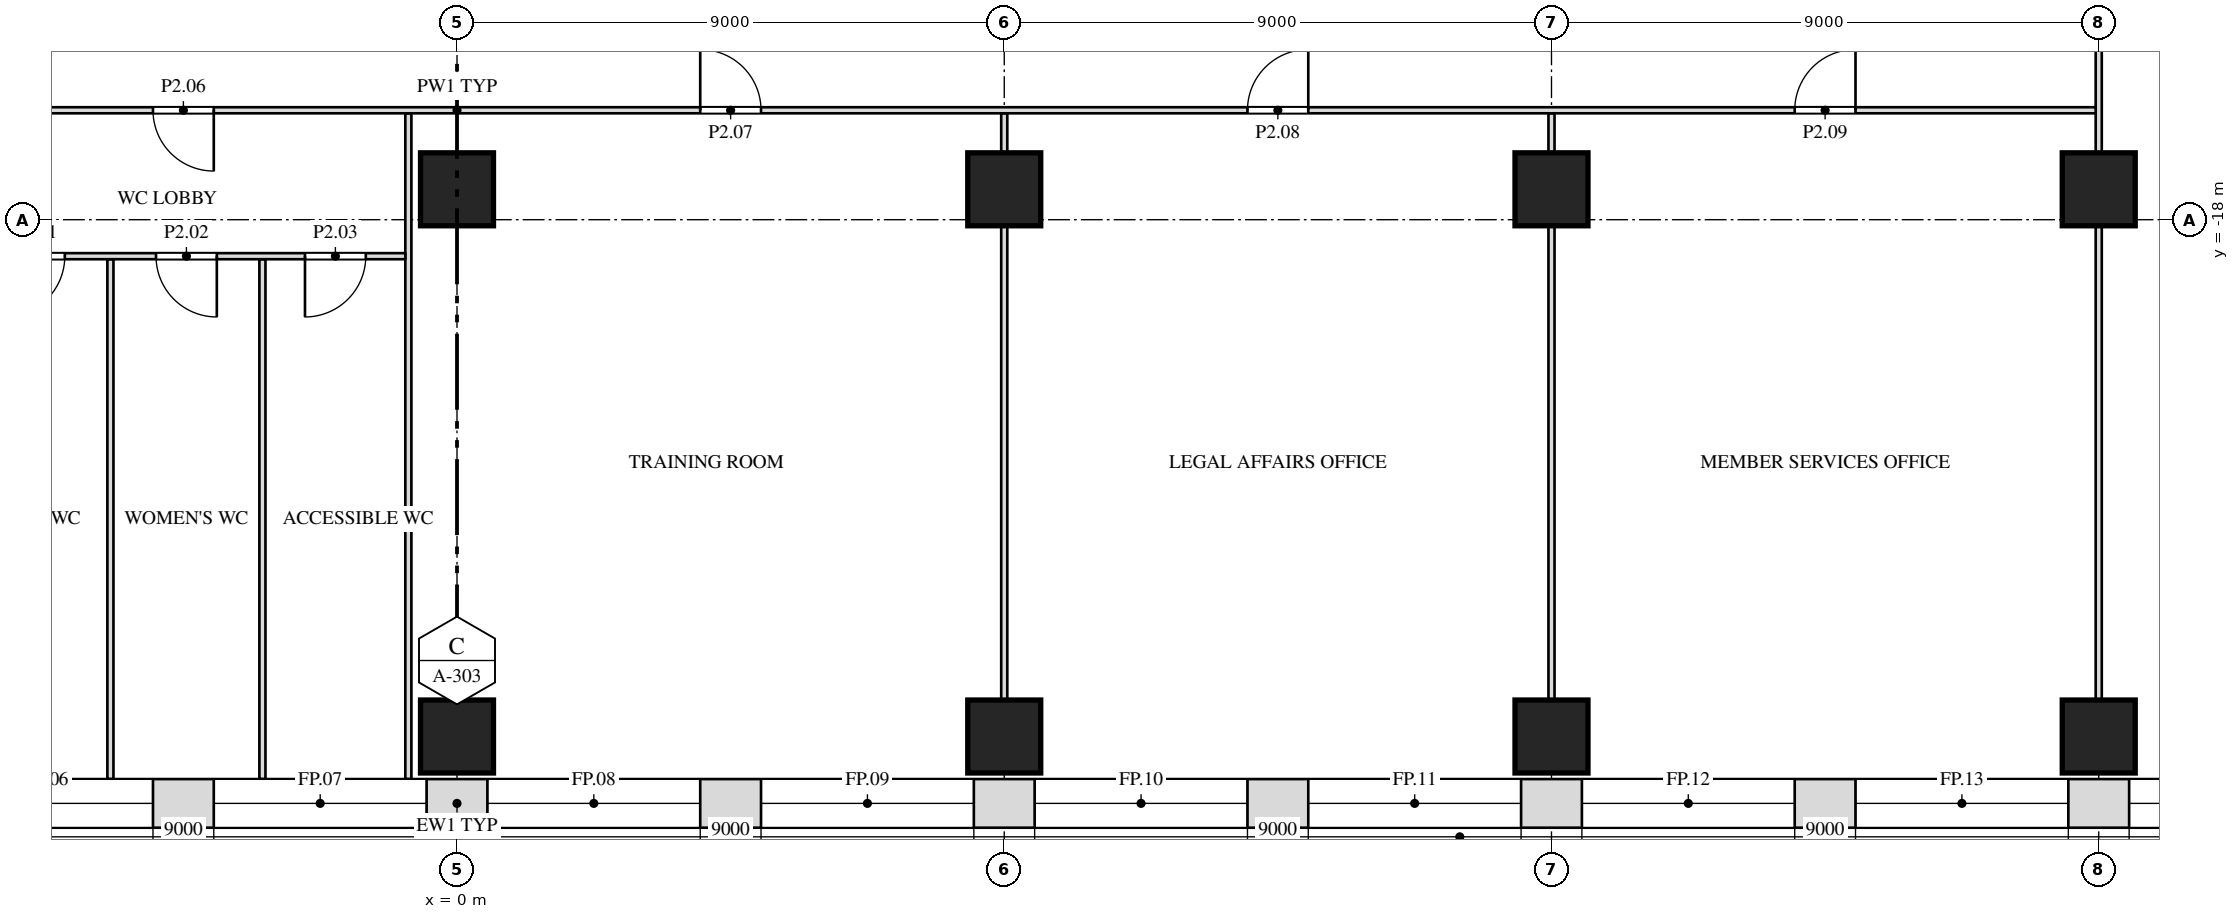
"""IFC4 building model, lengths in metres.
Left out: names, types, materials, properties, quantities, classifications, styles, units other than length and angle.
Written with IfcOpenShell. Run it as: python <this file> out.ifc"""

import sys

from ifc_helpers import new_model, si_unit, direction, frame, frame_2d, origin, origin_2d, place, context, subcontext, project, spatial, rectangle, extrude, element, fill, save


model = new_model("IFC4")
c1 = context("Model", 3, precision=1e-05, world=origin(), true_north=direction((0.0, 1.0)))
c2 = subcontext(c1, "Body", "Model", "MODEL_VIEW")
j1 = project(units=[si_unit("LENGTHUNIT", "METRE"), si_unit("PLANEANGLEUNIT", "RADIAN")], contexts=[c1])
p1 = place(None, origin())
s1 = spatial("IfcSite", under=j1, at=p1, CompositionType="ELEMENT")
p2 = place(p1, origin())
s2 = spatial("IfcBuilding", under=s1, at=p2, CompositionType="ELEMENT")
p3 = place(p2, frame((0.0, 0.0, 15.0)))
s3 = spatial("IfcBuildingStorey", under=s2, at=p3, CompositionType="ELEMENT", Elevation=15.0)
for number, where, z_axis, x_axis in (
    (1, (0.0, -26.5, 0.0), (0.0, 0.0, 1.0), (1.0, 0.0, 0.0)),
    (2, (9.0, -26.5, 0.0), (0.0, 0.0, 1.0), (1.0, 0.0, 0.0)),
    (3, (18.0, -26.5, 0.0), (0.0, 0.0, 1.0), (1.0, 0.0, 0.0)),
    (4, (27.0, -26.5, 0.0), (0.0, 0.0, 1.0), (1.0, 0.0, 0.0)),
    (5, (0.0, -17.5, 0.0), (0.0, 0.0, 1.0), (1.0, 0.0, 0.0)),
    (6, (9.0, -17.5, 0.0), (0.0, 0.0, 1.0), (1.0, 0.0, 0.0)),
    (7, (18.0, -17.5, 0.0), (0.0, 0.0, 1.0), (1.0, 0.0, 0.0)),
    (8, (27.0, -17.5, 0.0), (0.0, 0.0, 1.0), (1.0, 0.0, 0.0)),
):
    element("IfcColumn", number, at=place(p3, frame(where, z_axis=z_axis, x_axis=x_axis)), inside=s3, PredefinedType="COLUMN", context=c2, shape_type="SweptSolid", body=[
        extrude(rectangle(XDim=1.2, YDim=1.2, at=origin_2d()), origin(), (0.0, 0.0, 1.0), 6.0),
    ])
for number, where, z_axis, x_axis in (
    (9, (-5.7, -27.2, 0.0), (0.0, 0.0, 1.0), (0.0, 1.0, 0.0)),
    (10, (-3.2, -27.2, 0.0), (0.0, 0.0, 1.0), (0.0, 1.0, 0.0)),
):
    element("IfcWall", number, at=place(p3, frame(where, z_axis=z_axis, x_axis=x_axis)), inside=s3, PredefinedType="PARTITIONING", context=c2, shape_type="SweptSolid", body=[
        extrude(rectangle(XDim=8.55, YDim=0.1, at=frame_2d((4.275, 0.0))), origin(), (0.0, 0.0, 1.0), 5.7),
    ])
p4 = place(p3, frame((-0.8, -27.2, 0.0), z_axis=(0.0, 0.0, 1.0), x_axis=(0.0, 1.0, 0.0)))
e11 = element("IfcWall", 11, at=p4, inside=s3, PredefinedType="PARTITIONING", context=c2, shape_type="SweptSolid", body=[
    extrude(rectangle(XDim=10.95, YDim=0.1, at=frame_2d((5.475, 0.0))), origin(), (0.0, 0.0, 1.0), 5.7),
])
p5 = place(p3, frame((9.0, -25.9, 0.0), z_axis=(0.0, 0.0, 1.0), x_axis=(0.0, 1.0, 0.0)))
e12 = element("IfcWall", 12, at=p5, inside=s3, PredefinedType="PARTITIONING", context=c2, shape_type="SweptSolid", body=[
    extrude(rectangle(XDim=7.8, YDim=0.1, at=frame_2d((3.9, 0.0))), origin(), (0.0, 0.0, 1.0), 5.088),
])
p6 = place(p3, frame((9.0, -16.9, 0.0), z_axis=(0.0, 0.0, 1.0), x_axis=(0.0, 1.0, 0.0)))
e13 = element("IfcWall", 13, at=p6, inside=s3, PredefinedType="PARTITIONING", context=c2, shape_type="SweptSolid", body=[
    extrude(rectangle(XDim=0.65, YDim=0.1, at=frame_2d((0.325, 0.0))), origin(), (0.0, 0.0, 1.0), 5.7),
])
p7 = place(p3, frame((18.0, -25.9, 0.0), z_axis=(0.0, 0.0, 1.0), x_axis=(0.0, 1.0, 0.0)))
e14 = element("IfcWall", 14, at=p7, inside=s3, PredefinedType="PARTITIONING", context=c2, shape_type="SweptSolid", body=[
    extrude(rectangle(XDim=7.8, YDim=0.1, at=frame_2d((3.9, 0.0))), origin(), (0.0, 0.0, 1.0), 5.088),
])
p8 = place(p3, frame((18.0, -16.9, 0.0), z_axis=(0.0, 0.0, 1.0), x_axis=(0.0, 1.0, 0.0)))
e15 = element("IfcWall", 15, at=p8, inside=s3, PredefinedType="PARTITIONING", context=c2, shape_type="SweptSolid", body=[
    extrude(rectangle(XDim=0.65, YDim=0.1, at=frame_2d((0.325, 0.0))), origin(), (0.0, 0.0, 1.0), 5.7),
])
p9 = place(p3, frame((27.0, -25.9, 0.0), z_axis=(0.0, 0.0, 1.0), x_axis=(0.0, 1.0, 0.0)))
e16 = element("IfcWall", 16, at=p9, inside=s3, PredefinedType="PARTITIONING", context=c2, shape_type="SweptSolid", body=[
    extrude(rectangle(XDim=7.8, YDim=0.1, at=frame_2d((3.9, 0.0))), origin(), (0.0, 0.0, 1.0), 5.088),
])
p10 = place(p3, frame((27.0, -16.9, 0.0), z_axis=(0.0, 0.0, 1.0), x_axis=(0.0, 1.0, 0.0)))
e17 = element("IfcWall", 17, at=p10, inside=s3, PredefinedType="PARTITIONING", context=c2, shape_type="SweptSolid", body=[
    extrude(rectangle(XDim=2.85, YDim=0.1, at=frame_2d((1.425, 0.0))), origin(), (0.0, 0.0, 1.0), 5.088),
])
p11 = place(p3, frame((-8.15, -18.6, 0.0), z_axis=(0.0, 0.0, 1.0), x_axis=(1.0, 0.0, 0.0)))
e18 = element("IfcWall", 18, at=p11, inside=s3, PredefinedType="PARTITIONING", context=c2, shape_type="SweptSolid", body=[
    extrude(rectangle(XDim=7.3, YDim=0.1, at=frame_2d((3.65, 0.0))), origin(), (0.0, 0.0, 1.0), 5.7),
])
p12 = place(p11, frame((0.7, 0.0, 0.0)))
e19 = element("IfcOpeningElement", 19, at=p12, cuts=e18, PredefinedType="OPENING", context=c2, shape_type="SweptSolid", body=[
    extrude(rectangle(XDim=1.0, YDim=2.1, at=frame_2d((0.5, 1.05))), frame((0.0, 0.062, 0.0), z_axis=(0.0, -1.0, 0.0), x_axis=(1.0, 0.0, 0.0)), (0.0, 0.0, 1.0), 0.124),
])
p13 = place(p11, frame((3.2, 0.0, 0.0)))
e20 = element("IfcOpeningElement", 20, at=p13, cuts=e18, PredefinedType="OPENING", context=c2, shape_type="SweptSolid", body=[
    extrude(rectangle(XDim=1.0, YDim=2.1, at=frame_2d((0.5, 1.05))), frame((0.0, 0.062, 0.0), z_axis=(0.0, -1.0, 0.0), x_axis=(1.0, 0.0, 0.0)), (0.0, 0.0, 1.0), 0.124),
])
p14 = place(p11, frame((5.65, 0.0, 0.0)))
e21 = element("IfcOpeningElement", 21, at=p14, cuts=e18, PredefinedType="OPENING", context=c2, shape_type="SweptSolid", body=[
    extrude(rectangle(XDim=1.0, YDim=2.1, at=frame_2d((0.5, 1.05))), frame((0.0, 0.062, 0.0), z_axis=(0.0, -1.0, 0.0), x_axis=(1.0, 0.0, 0.0)), (0.0, 0.0, 1.0), 0.124),
])
p15 = place(p3, frame((-26.95, -16.2, 0.0), z_axis=(0.0, 0.0, 1.0), x_axis=(1.0, 0.0, 0.0)))
e22 = element("IfcWall", 22, at=p15, inside=s3, PredefinedType="PARTITIONING", context=c2, shape_type="SweptSolid", body=[
    extrude(rectangle(XDim=53.9, YDim=0.1, at=frame_2d((26.95, 0.0))), origin(), (0.0, 0.0, 1.0), 5.7),
])
p16 = place(p15, frame((6.2, 0.0, 0.0)))
e23 = element("IfcOpeningElement", 23, at=p16, cuts=e22, PredefinedType="OPENING", context=c2, shape_type="SweptSolid", body=[
    extrude(rectangle(XDim=1.0, YDim=2.1, at=frame_2d((0.5, 1.05))), frame((0.0, 0.062, 0.0), z_axis=(0.0, -1.0, 0.0), x_axis=(1.0, 0.0, 0.0)), (0.0, 0.0, 1.0), 0.124),
])
p17 = place(p15, frame((15.2, 0.0, 0.0)))
e24 = element("IfcOpeningElement", 24, at=p17, cuts=e22, PredefinedType="OPENING", context=c2, shape_type="SweptSolid", body=[
    extrude(rectangle(XDim=1.0, YDim=2.1, at=frame_2d((0.5, 1.05))), frame((0.0, 0.062, 0.0), z_axis=(0.0, -1.0, 0.0), x_axis=(1.0, 0.0, 0.0)), (0.0, 0.0, 1.0), 0.124),
])
p18 = place(p15, frame((21.95, 0.0, 0.0)))
e25 = element("IfcOpeningElement", 25, at=p18, cuts=e22, PredefinedType="OPENING", context=c2, shape_type="SweptSolid", body=[
    extrude(rectangle(XDim=1.0, YDim=2.1, at=frame_2d((0.5, 1.05))), frame((0.0, 0.062, 0.0), z_axis=(0.0, -1.0, 0.0), x_axis=(1.0, 0.0, 0.0)), (0.0, 0.0, 1.0), 0.124),
])
p19 = place(p15, frame((30.95, 0.0, 0.0)))
e26 = element("IfcOpeningElement", 26, at=p19, cuts=e22, PredefinedType="OPENING", context=c2, shape_type="SweptSolid", body=[
    extrude(rectangle(XDim=1.0, YDim=2.1, at=frame_2d((0.5, 1.05))), frame((0.0, 0.062, 0.0), z_axis=(0.0, -1.0, 0.0), x_axis=(1.0, 0.0, 0.0)), (0.0, 0.0, 1.0), 0.124),
])
p20 = place(p15, frame((39.95, 0.0, 0.0)))
e27 = element("IfcOpeningElement", 27, at=p20, cuts=e22, PredefinedType="OPENING", context=c2, shape_type="SweptSolid", body=[
    extrude(rectangle(XDim=1.0, YDim=2.1, at=frame_2d((0.5, 1.05))), frame((0.0, 0.062, 0.0), z_axis=(0.0, -1.0, 0.0), x_axis=(1.0, 0.0, 0.0)), (0.0, 0.0, 1.0), 0.124),
])
p21 = place(p15, frame((48.95, 0.0, 0.0)))
e28 = element("IfcOpeningElement", 28, at=p21, cuts=e22, PredefinedType="OPENING", context=c2, shape_type="SweptSolid", body=[
    extrude(rectangle(XDim=1.0, YDim=2.1, at=frame_2d((0.5, 1.05))), frame((0.0, 0.062, 0.0), z_axis=(0.0, -1.0, 0.0), x_axis=(1.0, 0.0, 0.0)), (0.0, 0.0, 1.0), 0.124),
])
p22 = place(p3, frame((-32.948, -27.6, 0.0), z_axis=(0.0, 0.0, 1.0), x_axis=(1.0, 0.0, 0.0)))
e29 = element("IfcWall", 29, at=p22, inside=s3, PredefinedType="SOLIDWALL", context=c2, shape_type="SweptSolid", body=[
    extrude(rectangle(XDim=65.895, YDim=0.8, at=frame_2d((32.948, 0.0))), origin(), (0.0, 0.0, 1.0), 5.7),
])
p23 = place(p22, frame((1.948, 0.0, 1.0)))
e30 = element("IfcOpeningElement", 30, at=p23, cuts=e29, PredefinedType="OPENING", context=c2, shape_type="SweptSolid", body=[
    extrude(rectangle(XDim=3.5, YDim=4.0, at=frame_2d((1.75, 2.0))), frame((0.0, 0.412, 0.0), z_axis=(0.0, -1.0, 0.0), x_axis=(1.0, 0.0, 0.0)), (0.0, 0.0, 1.0), 0.824),
])
p24 = place(p22, frame((6.448, 0.0, 1.0)))
e31 = element("IfcOpeningElement", 31, at=p24, cuts=e29, PredefinedType="OPENING", context=c2, shape_type="SweptSolid", body=[
    extrude(rectangle(XDim=3.5, YDim=4.0, at=frame_2d((1.75, 2.0))), frame((0.0, 0.412, 0.0), z_axis=(0.0, -1.0, 0.0), x_axis=(1.0, 0.0, 0.0)), (0.0, 0.0, 1.0), 0.824),
])
p25 = place(p22, frame((10.948, 0.0, 1.0)))
e32 = element("IfcOpeningElement", 32, at=p25, cuts=e29, PredefinedType="OPENING", context=c2, shape_type="SweptSolid", body=[
    extrude(rectangle(XDim=3.5, YDim=4.0, at=frame_2d((1.75, 2.0))), frame((0.0, 0.412, 0.0), z_axis=(0.0, -1.0, 0.0), x_axis=(1.0, 0.0, 0.0)), (0.0, 0.0, 1.0), 0.824),
])
p26 = place(p22, frame((15.448, 0.0, 1.0)))
e33 = element("IfcOpeningElement", 33, at=p26, cuts=e29, PredefinedType="OPENING", context=c2, shape_type="SweptSolid", body=[
    extrude(rectangle(XDim=3.5, YDim=4.0, at=frame_2d((1.75, 2.0))), frame((0.0, 0.412, 0.0), z_axis=(0.0, -1.0, 0.0), x_axis=(1.0, 0.0, 0.0)), (0.0, 0.0, 1.0), 0.824),
])
p27 = place(p22, frame((19.948, 0.0, 1.0)))
e34 = element("IfcOpeningElement", 34, at=p27, cuts=e29, PredefinedType="OPENING", context=c2, shape_type="SweptSolid", body=[
    extrude(rectangle(XDim=3.5, YDim=4.0, at=frame_2d((1.75, 2.0))), frame((0.0, 0.412, 0.0), z_axis=(0.0, -1.0, 0.0), x_axis=(1.0, 0.0, 0.0)), (0.0, 0.0, 1.0), 0.824),
])
p28 = place(p22, frame((24.448, 0.0, 1.0)))
e35 = element("IfcOpeningElement", 35, at=p28, cuts=e29, PredefinedType="OPENING", context=c2, shape_type="SweptSolid", body=[
    extrude(rectangle(XDim=3.5, YDim=4.0, at=frame_2d((1.75, 2.0))), frame((0.0, 0.412, 0.0), z_axis=(0.0, -1.0, 0.0), x_axis=(1.0, 0.0, 0.0)), (0.0, 0.0, 1.0), 0.824),
])
p29 = place(p22, frame((28.948, 0.0, 1.0)))
e36 = element("IfcOpeningElement", 36, at=p29, cuts=e29, PredefinedType="OPENING", context=c2, shape_type="SweptSolid", body=[
    extrude(rectangle(XDim=3.5, YDim=4.0, at=frame_2d((1.75, 2.0))), frame((0.0, 0.412, 0.0), z_axis=(0.0, -1.0, 0.0), x_axis=(1.0, 0.0, 0.0)), (0.0, 0.0, 1.0), 0.824),
])
p30 = place(p22, frame((33.448, 0.0, 1.0)))
e37 = element("IfcOpeningElement", 37, at=p30, cuts=e29, PredefinedType="OPENING", context=c2, shape_type="SweptSolid", body=[
    extrude(rectangle(XDim=3.5, YDim=4.0, at=frame_2d((1.75, 2.0))), frame((0.0, 0.412, 0.0), z_axis=(0.0, -1.0, 0.0), x_axis=(1.0, 0.0, 0.0)), (0.0, 0.0, 1.0), 0.824),
])
p31 = place(p22, frame((37.948, 0.0, 1.0)))
e38 = element("IfcOpeningElement", 38, at=p31, cuts=e29, PredefinedType="OPENING", context=c2, shape_type="SweptSolid", body=[
    extrude(rectangle(XDim=3.5, YDim=4.0, at=frame_2d((1.75, 2.0))), frame((0.0, 0.412, 0.0), z_axis=(0.0, -1.0, 0.0), x_axis=(1.0, 0.0, 0.0)), (0.0, 0.0, 1.0), 0.824),
])
p32 = place(p22, frame((42.448, 0.0, 1.0)))
e39 = element("IfcOpeningElement", 39, at=p32, cuts=e29, PredefinedType="OPENING", context=c2, shape_type="SweptSolid", body=[
    extrude(rectangle(XDim=3.5, YDim=4.0, at=frame_2d((1.75, 2.0))), frame((0.0, 0.412, 0.0), z_axis=(0.0, -1.0, 0.0), x_axis=(1.0, 0.0, 0.0)), (0.0, 0.0, 1.0), 0.824),
])
p33 = place(p22, frame((46.948, 0.0, 1.0)))
e40 = element("IfcOpeningElement", 40, at=p33, cuts=e29, PredefinedType="OPENING", context=c2, shape_type="SweptSolid", body=[
    extrude(rectangle(XDim=3.5, YDim=4.0, at=frame_2d((1.75, 2.0))), frame((0.0, 0.412, 0.0), z_axis=(0.0, -1.0, 0.0), x_axis=(1.0, 0.0, 0.0)), (0.0, 0.0, 1.0), 0.824),
])
p34 = place(p22, frame((51.448, 0.0, 1.0)))
e41 = element("IfcOpeningElement", 41, at=p34, cuts=e29, PredefinedType="OPENING", context=c2, shape_type="SweptSolid", body=[
    extrude(rectangle(XDim=3.5, YDim=4.0, at=frame_2d((1.75, 2.0))), frame((0.0, 0.412, 0.0), z_axis=(0.0, -1.0, 0.0), x_axis=(1.0, 0.0, 0.0)), (0.0, 0.0, 1.0), 0.824),
])
p35 = place(p22, frame((55.948, 0.0, 1.0)))
e42 = element("IfcOpeningElement", 42, at=p35, cuts=e29, PredefinedType="OPENING", context=c2, shape_type="SweptSolid", body=[
    extrude(rectangle(XDim=3.5, YDim=4.0, at=frame_2d((1.75, 2.0))), frame((0.0, 0.412, 0.0), z_axis=(0.0, -1.0, 0.0), x_axis=(1.0, 0.0, 0.0)), (0.0, 0.0, 1.0), 0.824),
])
p36 = place(p22, frame((60.448, 0.0, 1.0)))
e43 = element("IfcOpeningElement", 43, at=p36, cuts=e29, PredefinedType="OPENING", context=c2, shape_type="SweptSolid", body=[
    extrude(rectangle(XDim=3.5, YDim=4.0, at=frame_2d((1.75, 2.0))), frame((0.0, 0.412, 0.0), z_axis=(0.0, -1.0, 0.0), x_axis=(1.0, 0.0, 0.0)), (0.0, 0.0, 1.0), 0.824),
])
p37 = place(p12, origin())
e44 = element("IfcDoor", 44, at=p37, inside=s3, OperationType="SINGLE_SWING_RIGHT", PredefinedType="DOOR", context=c2, shape_type="SweptSolid", body=[
    extrude(rectangle(XDim=1.0, YDim=2.1, at=frame_2d((0.5, 1.05))), frame((0.0, 0.025, 0.0), z_axis=(0.0, -1.0, 0.0), x_axis=(1.0, 0.0, 0.0)), (0.0, 0.0, 1.0), 0.05),
])
fill(e19, e44)
p38 = place(p13, origin())
e45 = element("IfcDoor", 45, at=p38, inside=s3, OperationType="SINGLE_SWING_LEFT", PredefinedType="DOOR", context=c2, shape_type="SweptSolid", body=[
    extrude(rectangle(XDim=1.0, YDim=2.1, at=frame_2d((0.5, 1.05))), frame((0.0, 0.025, 0.0), z_axis=(0.0, -1.0, 0.0), x_axis=(1.0, 0.0, 0.0)), (0.0, 0.0, 1.0), 0.05),
])
fill(e20, e45)
p39 = place(p14, origin())
e46 = element("IfcDoor", 46, at=p39, inside=s3, OperationType="SINGLE_SWING_RIGHT", PredefinedType="DOOR", context=c2, shape_type="SweptSolid", body=[
    extrude(rectangle(XDim=1.0, YDim=2.1, at=frame_2d((0.5, 1.05))), frame((0.0, 0.025, 0.0), z_axis=(0.0, -1.0, 0.0), x_axis=(1.0, 0.0, 0.0)), (0.0, 0.0, 1.0), 0.05),
])
fill(e21, e46)
p40 = place(p18, origin())
e47 = element("IfcDoor", 47, at=p40, inside=s3, OperationType="SINGLE_SWING_LEFT", PredefinedType="DOOR", context=c2, shape_type="SweptSolid", body=[
    extrude(rectangle(XDim=1.0, YDim=2.1, at=frame_2d((0.5, 1.05))), frame((0.0, 0.025, 0.0), z_axis=(0.0, -1.0, 0.0), x_axis=(1.0, 0.0, 0.0)), (0.0, 0.0, 1.0), 0.05),
])
fill(e25, e47)
p41 = place(p19, origin())
e48 = element("IfcDoor", 48, at=p41, inside=s3, OperationType="SINGLE_SWING_LEFT", PredefinedType="DOOR", context=c2, shape_type="SweptSolid", body=[
    extrude(rectangle(XDim=1.0, YDim=2.1, at=frame_2d((0.5, 1.05))), frame((0.0, 0.025, 0.0), z_axis=(0.0, -1.0, 0.0), x_axis=(1.0, 0.0, 0.0)), (0.0, 0.0, 1.0), 0.05),
])
fill(e26, e48)
p42 = place(p20, origin())
e49 = element("IfcDoor", 49, at=p42, inside=s3, OperationType="SINGLE_SWING_RIGHT", PredefinedType="DOOR", context=c2, shape_type="SweptSolid", body=[
    extrude(rectangle(XDim=1.0, YDim=2.1, at=frame_2d((0.5, 1.05))), frame((0.0, 0.025, 0.0), z_axis=(0.0, -1.0, 0.0), x_axis=(1.0, 0.0, 0.0)), (0.0, 0.0, 1.0), 0.05),
])
fill(e27, e49)
p43 = place(p21, origin())
e50 = element("IfcDoor", 50, at=p43, inside=s3, OperationType="SINGLE_SWING_RIGHT", PredefinedType="DOOR", context=c2, shape_type="SweptSolid", body=[
    extrude(rectangle(XDim=1.0, YDim=2.1, at=frame_2d((0.5, 1.05))), frame((0.0, 0.025, 0.0), z_axis=(0.0, -1.0, 0.0), x_axis=(1.0, 0.0, 0.0)), (0.0, 0.0, 1.0), 0.05),
])
fill(e28, e50)
p44 = place(p28, origin())
e51 = element("IfcWindow", 51, at=p44, inside=s3, PartitioningType="SINGLE_PANEL", PredefinedType="WINDOW", context=c2, shape_type="SweptSolid", body=[
    extrude(rectangle(XDim=3.5, YDim=4.0, at=frame_2d((1.75, 2.0))), frame((0.0, 0.03, 0.0), z_axis=(0.0, -1.0, 0.0), x_axis=(1.0, 0.0, 0.0)), (0.0, 0.0, 1.0), 0.06),
])
fill(e35, e51)
p45 = place(p29, origin())
e52 = element("IfcWindow", 52, at=p45, inside=s3, PartitioningType="SINGLE_PANEL", PredefinedType="WINDOW", context=c2, shape_type="SweptSolid", body=[
    extrude(rectangle(XDim=3.5, YDim=4.0, at=frame_2d((1.75, 2.0))), frame((0.0, 0.03, 0.0), z_axis=(0.0, -1.0, 0.0), x_axis=(1.0, 0.0, 0.0)), (0.0, 0.0, 1.0), 0.06),
])
fill(e36, e52)
p46 = place(p30, origin())
e53 = element("IfcWindow", 53, at=p46, inside=s3, PartitioningType="SINGLE_PANEL", PredefinedType="WINDOW", context=c2, shape_type="SweptSolid", body=[
    extrude(rectangle(XDim=3.5, YDim=4.0, at=frame_2d((1.75, 2.0))), frame((0.0, 0.03, 0.0), z_axis=(0.0, -1.0, 0.0), x_axis=(1.0, 0.0, 0.0)), (0.0, 0.0, 1.0), 0.06),
])
fill(e37, e53)
p47 = place(p31, origin())
e54 = element("IfcWindow", 54, at=p47, inside=s3, PartitioningType="SINGLE_PANEL", PredefinedType="WINDOW", context=c2, shape_type="SweptSolid", body=[
    extrude(rectangle(XDim=3.5, YDim=4.0, at=frame_2d((1.75, 2.0))), frame((0.0, 0.03, 0.0), z_axis=(0.0, -1.0, 0.0), x_axis=(1.0, 0.0, 0.0)), (0.0, 0.0, 1.0), 0.06),
])
fill(e38, e54)
p48 = place(p32, origin())
e55 = element("IfcWindow", 55, at=p48, inside=s3, PartitioningType="SINGLE_PANEL", PredefinedType="WINDOW", context=c2, shape_type="SweptSolid", body=[
    extrude(rectangle(XDim=3.5, YDim=4.0, at=frame_2d((1.75, 2.0))), frame((0.0, 0.03, 0.0), z_axis=(0.0, -1.0, 0.0), x_axis=(1.0, 0.0, 0.0)), (0.0, 0.0, 1.0), 0.06),
])
fill(e39, e55)
p49 = place(p33, origin())
e56 = element("IfcWindow", 56, at=p49, inside=s3, PartitioningType="SINGLE_PANEL", PredefinedType="WINDOW", context=c2, shape_type="SweptSolid", body=[
    extrude(rectangle(XDim=3.5, YDim=4.0, at=frame_2d((1.75, 2.0))), frame((0.0, 0.03, 0.0), z_axis=(0.0, -1.0, 0.0), x_axis=(1.0, 0.0, 0.0)), (0.0, 0.0, 1.0), 0.06),
])
fill(e40, e56)
p50 = place(p34, origin())
e57 = element("IfcWindow", 57, at=p50, inside=s3, PartitioningType="SINGLE_PANEL", PredefinedType="WINDOW", context=c2, shape_type="SweptSolid", body=[
    extrude(rectangle(XDim=3.5, YDim=4.0, at=frame_2d((1.75, 2.0))), frame((0.0, 0.03, 0.0), z_axis=(0.0, -1.0, 0.0), x_axis=(1.0, 0.0, 0.0)), (0.0, 0.0, 1.0), 0.06),
])
fill(e41, e57)
p51 = place(p35, origin())
e58 = element("IfcWindow", 58, at=p51, inside=s3, PartitioningType="SINGLE_PANEL", PredefinedType="WINDOW", context=c2, shape_type="SweptSolid", body=[
    extrude(rectangle(XDim=3.5, YDim=4.0, at=frame_2d((1.75, 2.0))), frame((0.0, 0.03, 0.0), z_axis=(0.0, -1.0, 0.0), x_axis=(1.0, 0.0, 0.0)), (0.0, 0.0, 1.0), 0.06),
])
fill(e42, e58)
p52 = place(p36, origin())
e59 = element("IfcWindow", 59, at=p52, inside=s3, PartitioningType="SINGLE_PANEL", PredefinedType="WINDOW", context=c2, shape_type="SweptSolid", body=[
    extrude(rectangle(XDim=3.5, YDim=4.0, at=frame_2d((1.75, 2.0))), frame((0.0, 0.03, 0.0), z_axis=(0.0, -1.0, 0.0), x_axis=(1.0, 0.0, 0.0)), (0.0, 0.0, 1.0), 0.06),
])
fill(e43, e59)
save(model, sys.argv[1])
